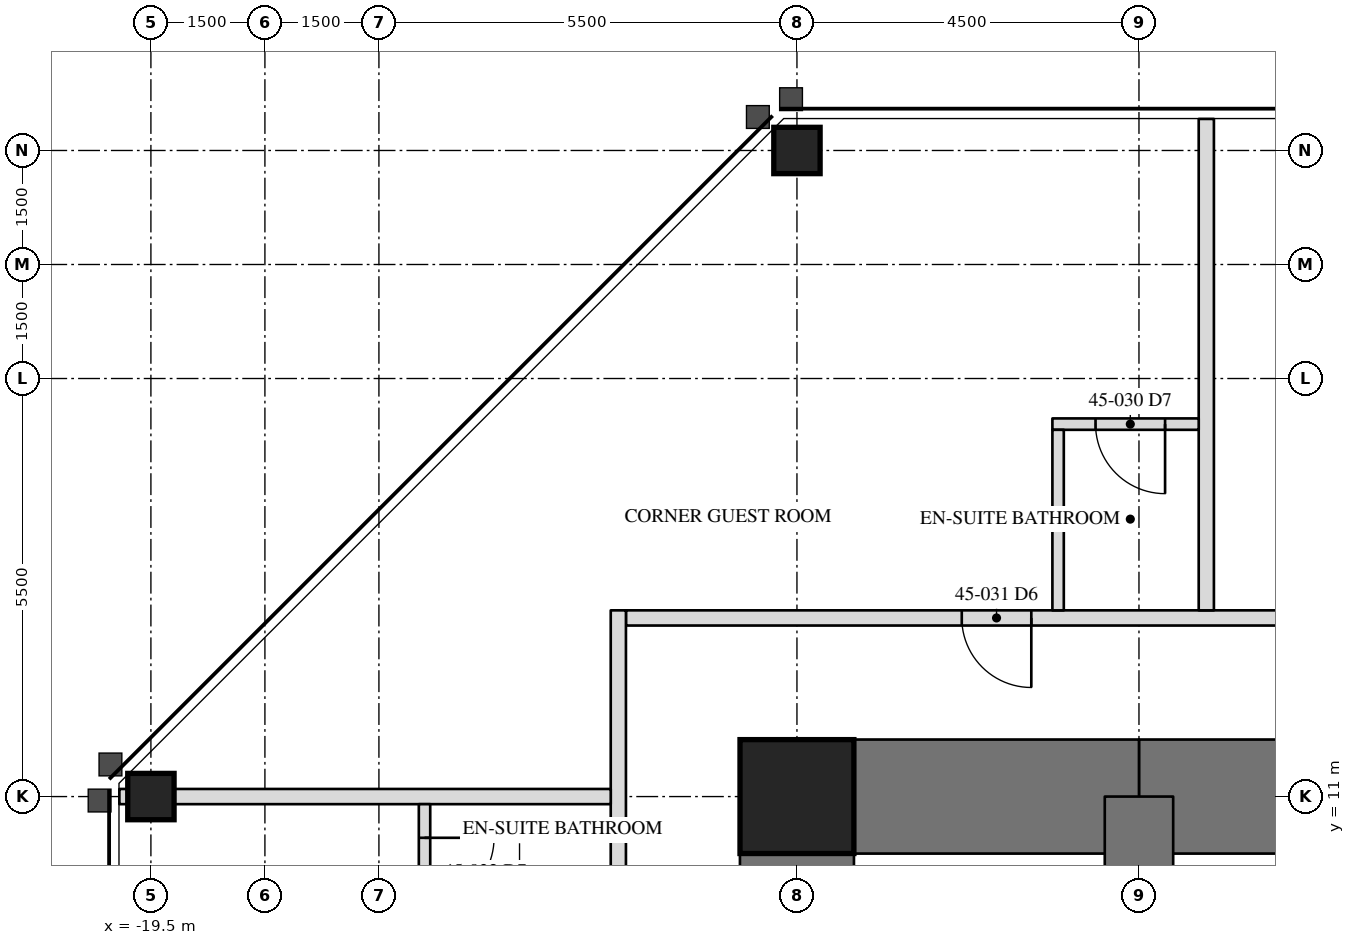
"""IFC4 building model, lengths in metres.
Left out: names, types, materials, properties, quantities, classifications, styles, units other than length and angle.
Written with IfcOpenShell. Run it as: python <this file> out.ifc"""

import sys

from ifc_helpers import new_model, si_unit, direction, frame, frame_2d, origin, origin_2d, place, context, subcontext, project, spatial, rectangle, hollow_rectangle, extrude, element, fill, save


model = new_model("IFC4")
c1 = context("Model", 3, precision=1e-05, world=origin(), true_north=direction((0.0, 1.0)))
c2 = subcontext(c1, "Body", "Model", "MODEL_VIEW")
j1 = project(units=[si_unit("LENGTHUNIT", "METRE"), si_unit("PLANEANGLEUNIT", "RADIAN")], contexts=[c1])
p1 = place(None, origin())
s1 = spatial("IfcSite", under=j1, at=p1, CompositionType="ELEMENT")
p2 = place(p1, origin())
s2 = spatial("IfcBuilding", under=s1, at=p2, CompositionType="ELEMENT")
p3 = place(p2, frame((0.0, 0.0, 194.2)))
s3 = spatial("IfcBuildingStorey", under=s2, at=p3, CompositionType="ELEMENT", Elevation=194.2)
for number, where, z_axis, x_axis in (
    (1, (-11.0, 19.5, 0.0), (0.0, 0.0, 1.0), (1.0, 0.0, 0.0)),
    (2, (-19.5, 11.0, 0.0), (0.0, 0.0, 1.0), (0.0, 1.0, 0.0)),
):
    element("IfcColumn", number, at=place(p3, frame(where, z_axis=z_axis, x_axis=x_axis)), inside=s3, PredefinedType="COLUMN", context=c2, shape_type="SweptSolid", body=[
        extrude(hollow_rectangle(XDim=0.61, YDim=0.61, WallThickness=0.076, at=origin_2d()), origin(), (0.0, 0.0, 1.0), 3.5),
    ])
p4 = place(p3, frame((-11.0, 11.0, 0.0), z_axis=(0.0, 0.0, 1.0), x_axis=(0.0, -1.0, 0.0)))
e3 = element("IfcWall", 3, at=p4, inside=s3, PredefinedType="SHEAR", context=c2, shape_type="SweptSolid", body=[
    extrude(rectangle(XDim=22.0, YDim=1.5, at=frame_2d((11.0, 0.0))), origin(), (0.0, 0.0, 1.0), 3.5),
])
p5 = place(p4, frame((15.393, 0.0, 0.0)))
e4 = element("IfcOpeningElement", 4, at=p5, cuts=e3, PredefinedType="OPENING", context=c2, shape_type="SweptSolid", body=[
    extrude(rectangle(XDim=0.915, YDim=2.134, at=frame_2d((0.458, 1.067))), frame((0.0, 0.76, 0.0), z_axis=(0.0, -1.0, 0.0), x_axis=(1.0, 0.0, 0.0)), (0.0, 0.0, 1.0), 1.52),
])
p6 = place(p3, frame((6.5, 11.0, 0.0), z_axis=(0.0, 0.0, 1.0), x_axis=(-1.0, 0.0, 0.0)))
e5 = element("IfcWall", 5, at=p6, inside=s3, PredefinedType="SHEAR", context=c2, shape_type="SweptSolid", body=[
    extrude(rectangle(XDim=13.0, YDim=1.5, at=frame_2d((6.5, 0.0))), origin(), (0.0, 0.0, 1.0), 3.5),
])
p7 = place(p6, frame((6.042, 0.0, 0.0)))
e6 = element("IfcOpeningElement", 6, at=p7, cuts=e5, PredefinedType="OPENING", context=c2, shape_type="SweptSolid", body=[
    extrude(rectangle(XDim=0.915, YDim=2.134, at=frame_2d((0.458, 1.067))), frame((0.0, 0.76, 0.0), z_axis=(0.0, -1.0, 0.0), x_axis=(1.0, 0.0, 0.0)), (0.0, 0.0, 1.0), 1.52),
])
p8 = place(p3, frame((-6.5, 11.0, 0.0), z_axis=(0.0, 0.0, 1.0), x_axis=(-1.0, 0.0, 0.0)))
e7 = element("IfcWall", 7, at=p8, inside=s3, PredefinedType="SHEAR", context=c2, shape_type="SweptSolid", body=[
    extrude(rectangle(XDim=4.5, YDim=1.5, at=frame_2d((2.25, 0.0))), origin(), (0.0, 0.0, 1.0), 3.5),
])
p9 = place(p3, frame((-6.5, 11.0, 0.0), z_axis=(0.0, 0.0, 1.0), x_axis=(0.0, -1.0, 0.0)))
e8 = element("IfcWall", 8, at=p9, inside=s3, PredefinedType="SHEAR", context=c2, shape_type="SweptSolid", body=[
    extrude(rectangle(XDim=4.5, YDim=0.9, at=frame_2d((2.25, 0.0))), origin(), (0.0, 0.0, 1.0), 3.5),
])
p10 = place(p3, frame((-11.0, 11.0, 0.0), z_axis=(0.0, 0.0, 1.0), x_axis=(1.0, 0.0, 0.0)))
e9 = element("IfcColumn", 9, at=p10, inside=s3, PredefinedType="COLUMN", context=c2, shape_type="SweptSolid", body=[
    extrude(hollow_rectangle(XDim=1.499, YDim=1.499, WallThickness=0.102, at=origin_2d()), origin(), (0.0, 0.0, 1.0), 3.5),
])
p11 = place(p3, frame((13.45, 13.35, 0.0), z_axis=(0.0, 0.0, 1.0), x_axis=(-1.0, 0.0, 0.0)))
e10 = element("IfcWall", 10, at=p11, inside=s3, PredefinedType="PARTITIONING", context=c2, shape_type="SweptSolid", body=[
    extrude(rectangle(XDim=26.7, YDim=0.2, at=frame_2d((13.35, 0.0))), origin(), (0.0, 0.0, 1.0), 3.31),
])
p12 = place(p11, frame((4.752, 0.0, 0.0)))
e11 = element("IfcOpeningElement", 11, at=p12, cuts=e10, PredefinedType="OPENING", context=c2, shape_type="SweptSolid", body=[
    extrude(rectangle(XDim=0.915, YDim=2.134, at=frame_2d((0.458, 1.067))), frame((0.0, 0.11, 0.0), z_axis=(0.0, -1.0, 0.0), x_axis=(1.0, 0.0, 0.0)), (0.0, 0.0, 1.0), 0.22),
])
p13 = place(p11, frame((10.204, 0.0, 0.0)))
e12 = element("IfcOpeningElement", 12, at=p13, cuts=e10, PredefinedType="OPENING", context=c2, shape_type="SweptSolid", body=[
    extrude(rectangle(XDim=0.915, YDim=2.134, at=frame_2d((0.458, 1.067))), frame((0.0, 0.11, 0.0), z_axis=(0.0, -1.0, 0.0), x_axis=(1.0, 0.0, 0.0)), (0.0, 0.0, 1.0), 0.22),
])
p14 = place(p11, frame((15.752, 0.0, 0.0)))
e13 = element("IfcOpeningElement", 13, at=p14, cuts=e10, PredefinedType="OPENING", context=c2, shape_type="SweptSolid", body=[
    extrude(rectangle(XDim=0.915, YDim=2.134, at=frame_2d((0.458, 1.067))), frame((0.0, 0.11, 0.0), z_axis=(0.0, -1.0, 0.0), x_axis=(1.0, 0.0, 0.0)), (0.0, 0.0, 1.0), 0.22),
])
p15 = place(p11, frame((21.366, 0.0, 0.0)))
e14 = element("IfcOpeningElement", 14, at=p15, cuts=e10, PredefinedType="OPENING", context=c2, shape_type="SweptSolid", body=[
    extrude(rectangle(XDim=0.915, YDim=2.134, at=frame_2d((0.458, 1.067))), frame((0.0, 0.11, 0.0), z_axis=(0.0, -1.0, 0.0), x_axis=(1.0, 0.0, 0.0)), (0.0, 0.0, 1.0), 0.22),
])
p16 = place(p3, frame((-13.35, 13.45, 0.0), z_axis=(0.0, 0.0, 1.0), x_axis=(0.0, -1.0, 0.0)))
e15 = element("IfcWall", 15, at=p16, inside=s3, PredefinedType="PARTITIONING", context=c2, shape_type="SweptSolid", body=[
    extrude(rectangle(XDim=26.7, YDim=0.2, at=frame_2d((13.35, 0.0))), origin(), (0.0, 0.0, 1.0), 3.31),
])
p17 = place(p16, frame((4.752, 0.0, 0.0)))
e16 = element("IfcOpeningElement", 16, at=p17, cuts=e15, PredefinedType="OPENING", context=c2, shape_type="SweptSolid", body=[
    extrude(rectangle(XDim=0.915, YDim=2.134, at=frame_2d((0.458, 1.067))), frame((0.0, 0.11, 0.0), z_axis=(0.0, -1.0, 0.0), x_axis=(1.0, 0.0, 0.0)), (0.0, 0.0, 1.0), 0.22),
])
p18 = place(p16, frame((10.204, 0.0, 0.0)))
e17 = element("IfcOpeningElement", 17, at=p18, cuts=e15, PredefinedType="OPENING", context=c2, shape_type="SweptSolid", body=[
    extrude(rectangle(XDim=0.915, YDim=2.134, at=frame_2d((0.458, 1.067))), frame((0.0, 0.11, 0.0), z_axis=(0.0, -1.0, 0.0), x_axis=(1.0, 0.0, 0.0)), (0.0, 0.0, 1.0), 0.22),
])
p19 = place(p16, frame((15.752, 0.0, 0.0)))
e18 = element("IfcOpeningElement", 18, at=p19, cuts=e15, PredefinedType="OPENING", context=c2, shape_type="SweptSolid", body=[
    extrude(rectangle(XDim=0.915, YDim=2.134, at=frame_2d((0.458, 1.067))), frame((0.0, 0.11, 0.0), z_axis=(0.0, -1.0, 0.0), x_axis=(1.0, 0.0, 0.0)), (0.0, 0.0, 1.0), 0.22),
])
p20 = place(p16, frame((21.366, 0.0, 0.0)))
e19 = element("IfcOpeningElement", 19, at=p20, cuts=e15, PredefinedType="OPENING", context=c2, shape_type="SweptSolid", body=[
    extrude(rectangle(XDim=0.915, YDim=2.134, at=frame_2d((0.458, 1.067))), frame((0.0, 0.11, 0.0), z_axis=(0.0, -1.0, 0.0), x_axis=(1.0, 0.0, 0.0)), (0.0, 0.0, 1.0), 0.22),
])
p21 = place(p3, frame((-5.614, 13.45, 0.0), z_axis=(0.0, 0.0, 1.0), x_axis=(0.0, 1.0, 0.0)))
e20 = element("IfcWall", 20, at=p21, inside=s3, PredefinedType="PARTITIONING", context=c2, shape_type="SweptSolid", body=[
    extrude(rectangle(XDim=6.465, YDim=0.2, at=frame_2d((3.232, 0.0))), origin(), (0.0, 0.0, 1.0), 3.31),
])
p22 = place(p3, frame((-5.714, 15.9, 0.0), z_axis=(0.0, 0.0, 1.0), x_axis=(-1.0, 0.0, 0.0)))
e21 = element("IfcWall", 21, at=p22, inside=s3, PredefinedType="PARTITIONING", context=c2, shape_type="SweptSolid", body=[
    extrude(rectangle(XDim=1.925, YDim=0.15, at=frame_2d((0.962, 0.0))), origin(), (0.0, 0.0, 1.0), 3.31),
])
p23 = place(p22, frame((0.442, 0.0, 0.0)))
e22 = element("IfcOpeningElement", 22, at=p23, cuts=e21, PredefinedType="OPENING", context=c2, shape_type="SweptSolid", body=[
    extrude(rectangle(XDim=0.915, YDim=2.032, at=frame_2d((0.458, 1.016))), frame((0.0, 0.085, 0.0), z_axis=(0.0, -1.0, 0.0), x_axis=(1.0, 0.0, 0.0)), (0.0, 0.0, 1.0), 0.17),
])
p24 = place(p3, frame((-7.564, 13.45, 0.0), z_axis=(0.0, 0.0, 1.0), x_axis=(0.0, 1.0, 0.0)))
e23 = element("IfcWall", 23, at=p24, inside=s3, PredefinedType="PARTITIONING", context=c2, shape_type="SweptSolid", body=[
    extrude(rectangle(XDim=2.375, YDim=0.15, at=frame_2d((1.188, 0.0))), origin(), (0.0, 0.0, 1.0), 3.31),
])
p25 = place(p3, frame((-13.45, 11.0, 0.0), z_axis=(0.0, 0.0, 1.0), x_axis=(-1.0, 0.0, 0.0)))
e24 = element("IfcWall", 24, at=p25, inside=s3, PredefinedType="PARTITIONING", context=c2, shape_type="SweptSolid", body=[
    extrude(rectangle(XDim=6.465, YDim=0.2, at=frame_2d((3.232, 0.0))), origin(), (0.0, 0.0, 1.0), 2.802),
])
p26 = place(p3, frame((-15.9, 10.9, 0.0), z_axis=(0.0, 0.0, 1.0), x_axis=(0.0, -1.0, 0.0)))
e25 = element("IfcWall", 25, at=p26, inside=s3, PredefinedType="PARTITIONING", context=c2, shape_type="SweptSolid", body=[
    extrude(rectangle(XDim=1.925, YDim=0.15, at=frame_2d((0.962, 0.0))), origin(), (0.0, 0.0, 1.0), 3.31),
])
p27 = place(p26, frame((0.442, 0.0, 0.0)))
e26 = element("IfcOpeningElement", 26, at=p27, cuts=e25, PredefinedType="OPENING", context=c2, shape_type="SweptSolid", body=[
    extrude(rectangle(XDim=0.915, YDim=2.032, at=frame_2d((0.458, 1.016))), frame((0.0, 0.085, 0.0), z_axis=(0.0, -1.0, 0.0), x_axis=(1.0, 0.0, 0.0)), (0.0, 0.0, 1.0), 0.17),
])
p28 = place(p23, origin())
e27 = element("IfcDoor", 27, at=p28, inside=s3, OperationType="SINGLE_SWING_LEFT", PredefinedType="DOOR", context=c2, shape_type="SweptSolid", body=[
    extrude(rectangle(XDim=0.915, YDim=2.032, at=frame_2d((0.458, 1.016))), frame((0.0, 0.025, 0.0), z_axis=(0.0, -1.0, 0.0), x_axis=(1.0, 0.0, 0.0)), (0.0, 0.0, 1.0), 0.05),
])
fill(e22, e27)
p29 = place(p15, origin())
e28 = element("IfcDoor", 28, at=p29, inside=s3, OperationType="SINGLE_SWING_LEFT", PredefinedType="DOOR", context=c2, shape_type="SweptSolid", body=[
    extrude(rectangle(XDim=0.915, YDim=2.134, at=frame_2d((0.458, 1.067))), frame((0.0, 0.025, 0.0), z_axis=(0.0, -1.0, 0.0), x_axis=(1.0, 0.0, 0.0)), (0.0, 0.0, 1.0), 0.05),
])
fill(e14, e28)
p30 = place(p27, origin())
e29 = element("IfcDoor", 29, at=p30, inside=s3, OperationType="SINGLE_SWING_LEFT", PredefinedType="DOOR", context=c2, shape_type="SweptSolid", body=[
    extrude(rectangle(XDim=0.915, YDim=2.032, at=frame_2d((0.458, 1.016))), frame((0.0, 0.025, 0.0), z_axis=(0.0, -1.0, 0.0), x_axis=(1.0, 0.0, 0.0)), (0.0, 0.0, 1.0), 0.05),
])
fill(e26, e29)
save(model, sys.argv[1])
